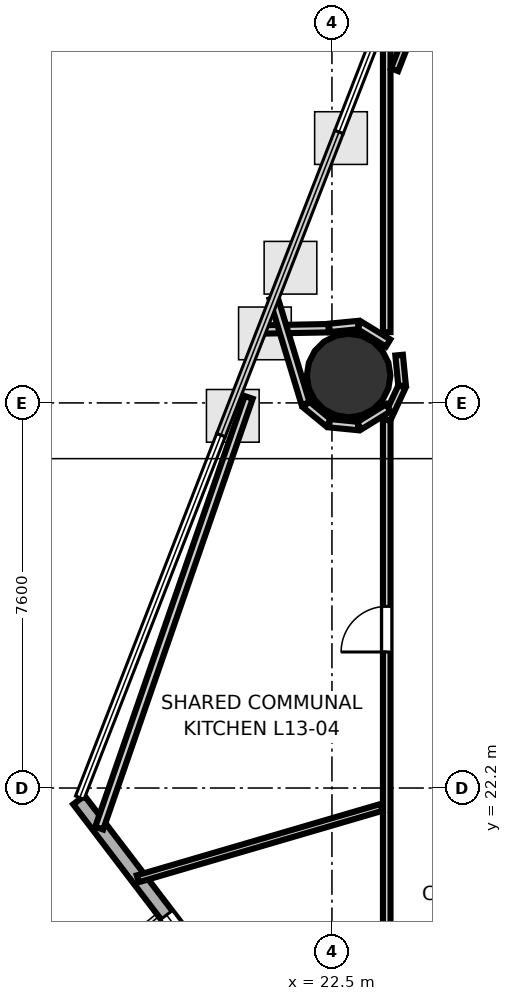
"""IFC4 building model, lengths in metres.
Left out: names, types, materials, properties, quantities, classifications, styles, units other than length and angle.
Written with IfcOpenShell. Run it as: python <this file> out.ifc"""

import sys

from ifc_helpers import new_model, si_unit, direction, frame, frame_2d, origin, origin_2d, place, context, subcontext, project, spatial, rectangle, hollow_circle, extrude, element, fill, save


model = new_model("IFC4")
c1 = context("Model", 3, precision=1e-05, world=origin(), true_north=direction((0.0, 1.0)))
c2 = subcontext(c1, "Body", "Model", "MODEL_VIEW")
j1 = project(units=[si_unit("LENGTHUNIT", "METRE"), si_unit("PLANEANGLEUNIT", "RADIAN")], contexts=[c1])
p1 = place(None, origin())
s1 = spatial("IfcSite", under=j1, at=p1, CompositionType="ELEMENT")
p2 = place(p1, origin())
s2 = spatial("IfcBuilding", under=s1, at=p2, CompositionType="ELEMENT")
p3 = place(p2, frame((0.0, 0.0, 56.2)))
s3 = spatial("IfcBuildingStorey", under=s2, at=p3, CompositionType="ELEMENT", Elevation=56.2)
p4 = place(p3, frame((22.829, 30.34, 0.0), z_axis=(0.0, 0.0, 1.0), x_axis=(1.0, 0.0, 0.0)))
e1 = element("IfcColumn", 1, at=p4, inside=s3, PredefinedType="COLUMN", context=c2, shape_type="SweptSolid", body=[
    extrude(hollow_circle(Radius=0.825, WallThickness=0.04, at=origin_2d()), origin(), (0.0, 0.0, 1.0), 3.7),
])
p5 = place(p3, frame((17.505, 21.964, 0.0), z_axis=(0.0, 0.0, 1.0), x_axis=(0.606458166226, -0.795115395787, 0.0)))
e2 = element("IfcWall", 2, at=p5, inside=s3, PredefinedType="SOLIDWALL", context=c2, shape_type="SweptSolid", body=[
    extrude(rectangle(XDim=12.513, YDim=0.28, at=frame_2d((6.256, 0.0))), origin(), (0.0, 0.0, 1.0), 3.52),
])
p6 = place(p5, frame((2.854, 0.0, 0.85)))
e3 = element("IfcOpeningElement", 3, at=p6, cuts=e2, PredefinedType="OPENING", context=c2, shape_type="SweptSolid", body=[
    extrude(rectangle(XDim=1.8, YDim=2.1, at=frame_2d((0.9, 1.05))), frame((0.0, 0.15, 0.0), z_axis=(0.0, -1.0, 0.0), x_axis=(1.0, 0.0, 0.0)), (0.0, 0.0, 1.0), 0.3),
])
p7 = place(p5, frame((7.859, 0.0, 0.85)))
e4 = element("IfcOpeningElement", 4, at=p7, cuts=e2, PredefinedType="OPENING", context=c2, shape_type="SweptSolid", body=[
    extrude(rectangle(XDim=1.8, YDim=2.1, at=frame_2d((0.9, 1.05))), frame((0.0, 0.15, 0.0), z_axis=(0.0, -1.0, 0.0), x_axis=(1.0, 0.0, 0.0)), (0.0, 0.0, 1.0), 0.3),
])
p8 = place(p3, frame((23.581, 31.197, 0.0), z_axis=(0.0, 0.0, 1.0), x_axis=(0.0, 1.0, 0.0)))
e5 = element("IfcWall", 5, at=p8, inside=s3, PredefinedType="PARTITIONING", context=c2, shape_type="SweptSolid", body=[
    extrude(rectangle(XDim=6.387, YDim=0.15, at=frame_2d((3.194, 0.0))), origin(), (0.0, 0.0, 1.0), 2.798),
])
p9 = place(p3, frame((23.736, 36.375, 0.0), z_axis=(0.0, 0.0, 1.0), x_axis=(0.362842007319, 0.931850673512, 0.0)))
e6 = element("IfcWall", 6, at=p9, inside=s3, PredefinedType="PARTITIONING", context=c2, shape_type="SweptSolid", body=[
    extrude(rectangle(XDim=2.59, YDim=0.15, at=frame_2d((1.295, 0.0))), origin(), (0.0, 0.0, 1.0), 2.84),
])
p10 = place(p3, frame((23.581, 18.15, 0.0), z_axis=(0.0, 0.0, 1.0), x_axis=(0.0, 1.0, 0.0)))
e7 = element("IfcWall", 7, at=p10, inside=s3, PredefinedType="PARTITIONING", context=c2, shape_type="SweptSolid", body=[
    extrude(rectangle(XDim=11.333, YDim=0.15, at=frame_2d((5.667, 0.0))), origin(), (0.0, 0.0, 1.0), 2.798),
])
p11 = place(p10, frame((6.735, 0.0, 0.0)))
e8 = element("IfcOpeningElement", 8, at=p11, cuts=e7, PredefinedType="OPENING", context=c2, shape_type="SweptSolid", body=[
    extrude(rectangle(XDim=0.9, YDim=2.1, at=frame_2d((0.45, 1.05))), frame((0.0, 0.085, 0.0), z_axis=(0.0, -1.0, 0.0), x_axis=(1.0, 0.0, 0.0)), (0.0, 0.0, 1.0), 0.17),
])
p12 = place(p3, frame((23.578, 29.47, 0.0), z_axis=(0.0, 0.0, 1.0), x_axis=(0.421827918194, 0.906675910914, 0.0)))
e9 = element("IfcWall", 9, at=p12, inside=s3, PredefinedType="PARTITIONING", context=c2, shape_type="SweptSolid", body=[
    extrude(rectangle(XDim=0.72, YDim=0.15, at=frame_2d((0.36, 0.0))), origin(), (0.0, 0.0, 1.0), 2.84),
])
p13 = place(p3, frame((23.885, 30.139, 0.0), z_axis=(0.0, 0.0, 1.0), x_axis=(-0.0981888168, 0.995167803064, 0.0)))
e10 = element("IfcWall", 10, at=p13, inside=s3, PredefinedType="PARTITIONING", context=c2, shape_type="SweptSolid", body=[
    extrude(rectangle(XDim=0.607, YDim=0.15, at=frame_2d((0.303, 0.0))), origin(), (0.0, 0.0, 1.0), 2.84),
])
p14 = place(p3, frame((18.667, 20.409, 0.0), z_axis=(0.0, 0.0, 1.0), x_axis=(0.95968744244, 0.281069409263, 0.0)))
e11 = element("IfcWall", 11, at=p14, inside=s3, PredefinedType="PARTITIONING", context=c2, shape_type="SweptSolid", body=[
    extrude(rectangle(XDim=5.014, YDim=0.14, at=frame_2d((2.507, 0.0))), origin(), (0.0, 0.0, 1.0), 2.84),
])
p15 = place(p3, frame((23.608, 30.982, 0.0), z_axis=(0.0, 0.0, 1.0), x_axis=(-0.852045812822, 0.523467222328, 0.0)))
e12 = element("IfcWall", 12, at=p15, inside=s3, PredefinedType="PLUMBINGWALL", context=c2, shape_type="SweptSolid", body=[
    extrude(rectangle(XDim=0.67, YDim=0.165, at=frame_2d((0.335, 0.0))), origin(), (0.0, 0.0, 1.0), 2.798),
])
p16 = place(p3, frame((23.018, 31.337, 0.0), z_axis=(0.0, 0.0, 1.0), x_axis=(-0.995208995167, -0.097770424665, 0.0)))
e13 = element("IfcWall", 13, at=p16, inside=s3, PredefinedType="PLUMBINGWALL", context=c2, shape_type="SweptSolid", body=[
    extrude(rectangle(XDim=0.572, YDim=0.165, at=frame_2d((0.286, 0.0))), origin(), (0.0, 0.0, 1.0), 2.84),
])
p17 = place(p3, frame((22.432, 31.274, 0.0), z_axis=(0.0, 0.0, 1.0), x_axis=(-0.999826656126, -0.018618745924, 0.0)))
e14 = element("IfcWall", 14, at=p17, inside=s3, PredefinedType="PLUMBINGWALL", context=c2, shape_type="SweptSolid", body=[
    extrude(rectangle(XDim=1.311, YDim=0.165, at=frame_2d((0.656, 0.0))), origin(), (0.0, 0.0, 1.0), 2.798),
])
p18 = place(p3, frame((21.348, 31.867, 0.0), z_axis=(0.0, 0.0, 1.0), x_axis=(0.290268869928, -0.95694513069, 0.0)))
e15 = element("IfcWall", 15, at=p18, inside=s3, PredefinedType="PLUMBINGWALL", context=c2, shape_type="SweptSolid", body=[
    extrude(rectangle(XDim=2.177, YDim=0.165, at=frame_2d((1.088, 0.0))), origin(), (0.0, 0.0, 1.0), 2.798),
])
p19 = place(p3, frame((21.99, 29.769, 0.0), z_axis=(0.0, 0.0, 1.0), x_axis=(0.773062635709, -0.634329694458, 0.0)))
e16 = element("IfcWall", 16, at=p19, inside=s3, PredefinedType="PLUMBINGWALL", context=c2, shape_type="SweptSolid", body=[
    extrude(rectangle(XDim=0.572, YDim=0.165, at=frame_2d((0.286, 0.0))), origin(), (0.0, 0.0, 1.0), 2.84),
])
p20 = place(p3, frame((22.449, 29.399, 0.0), z_axis=(0.0, 0.0, 1.0), x_axis=(0.995167364461, -0.098193262045, 0.0)))
e17 = element("IfcWall", 17, at=p20, inside=s3, PredefinedType="PLUMBINGWALL", context=c2, shape_type="SweptSolid", body=[
    extrude(rectangle(XDim=0.572, YDim=0.165, at=frame_2d((0.286, 0.0))), origin(), (0.0, 0.0, 1.0), 2.798),
])
p21 = place(p3, frame((23.038, 29.348, 0.0), z_axis=(0.0, 0.0, 1.0), x_axis=(0.850157603054, 0.526528299306, 0.0)))
e18 = element("IfcWall", 18, at=p21, inside=s3, PredefinedType="PLUMBINGWALL", context=c2, shape_type="SweptSolid", body=[
    extrude(rectangle(XDim=0.677, YDim=0.165, at=frame_2d((0.339, 0.0))), origin(), (0.0, 0.0, 1.0), 2.798),
])
p22 = place(p3, frame((17.907, 21.409, 0.0), z_axis=(0.0, 0.0, 1.0), x_axis=(0.327869084201, 0.944723167719, 0.0)))
e19 = element("IfcWall", 19, at=p22, inside=s3, PredefinedType="PLUMBINGWALL", context=c2, shape_type="SweptSolid", body=[
    extrude(rectangle(XDim=8.997, YDim=0.165, at=frame_2d((4.499, 0.0))), origin(), (0.0, 0.0, 1.0), 2.798),
])
p23 = place(p11, origin())
e20 = element("IfcDoor", 20, at=p23, inside=s3, OperationType="SINGLE_SWING_LEFT", PredefinedType="DOOR", context=c2, shape_type="SweptSolid", body=[
    extrude(rectangle(XDim=0.9, YDim=2.1, at=frame_2d((0.45, 1.05))), frame((0.0, 0.025, 0.0), z_axis=(0.0, -1.0, 0.0), x_axis=(1.0, 0.0, 0.0)), (0.0, 0.0, 1.0), 0.05),
])
fill(e8, e20)
p24 = place(p6, origin())
e21 = element("IfcWindow", 21, at=p24, inside=s3, PartitioningType="SINGLE_PANEL", PredefinedType="WINDOW", context=c2, shape_type="SweptSolid", body=[
    extrude(rectangle(XDim=1.8, YDim=2.1, at=frame_2d((0.9, 1.05))), frame((0.0, 0.03, 0.0), z_axis=(0.0, -1.0, 0.0), x_axis=(1.0, 0.0, 0.0)), (0.0, 0.0, 1.0), 0.06),
])
fill(e3, e21)
save(model, sys.argv[1])
